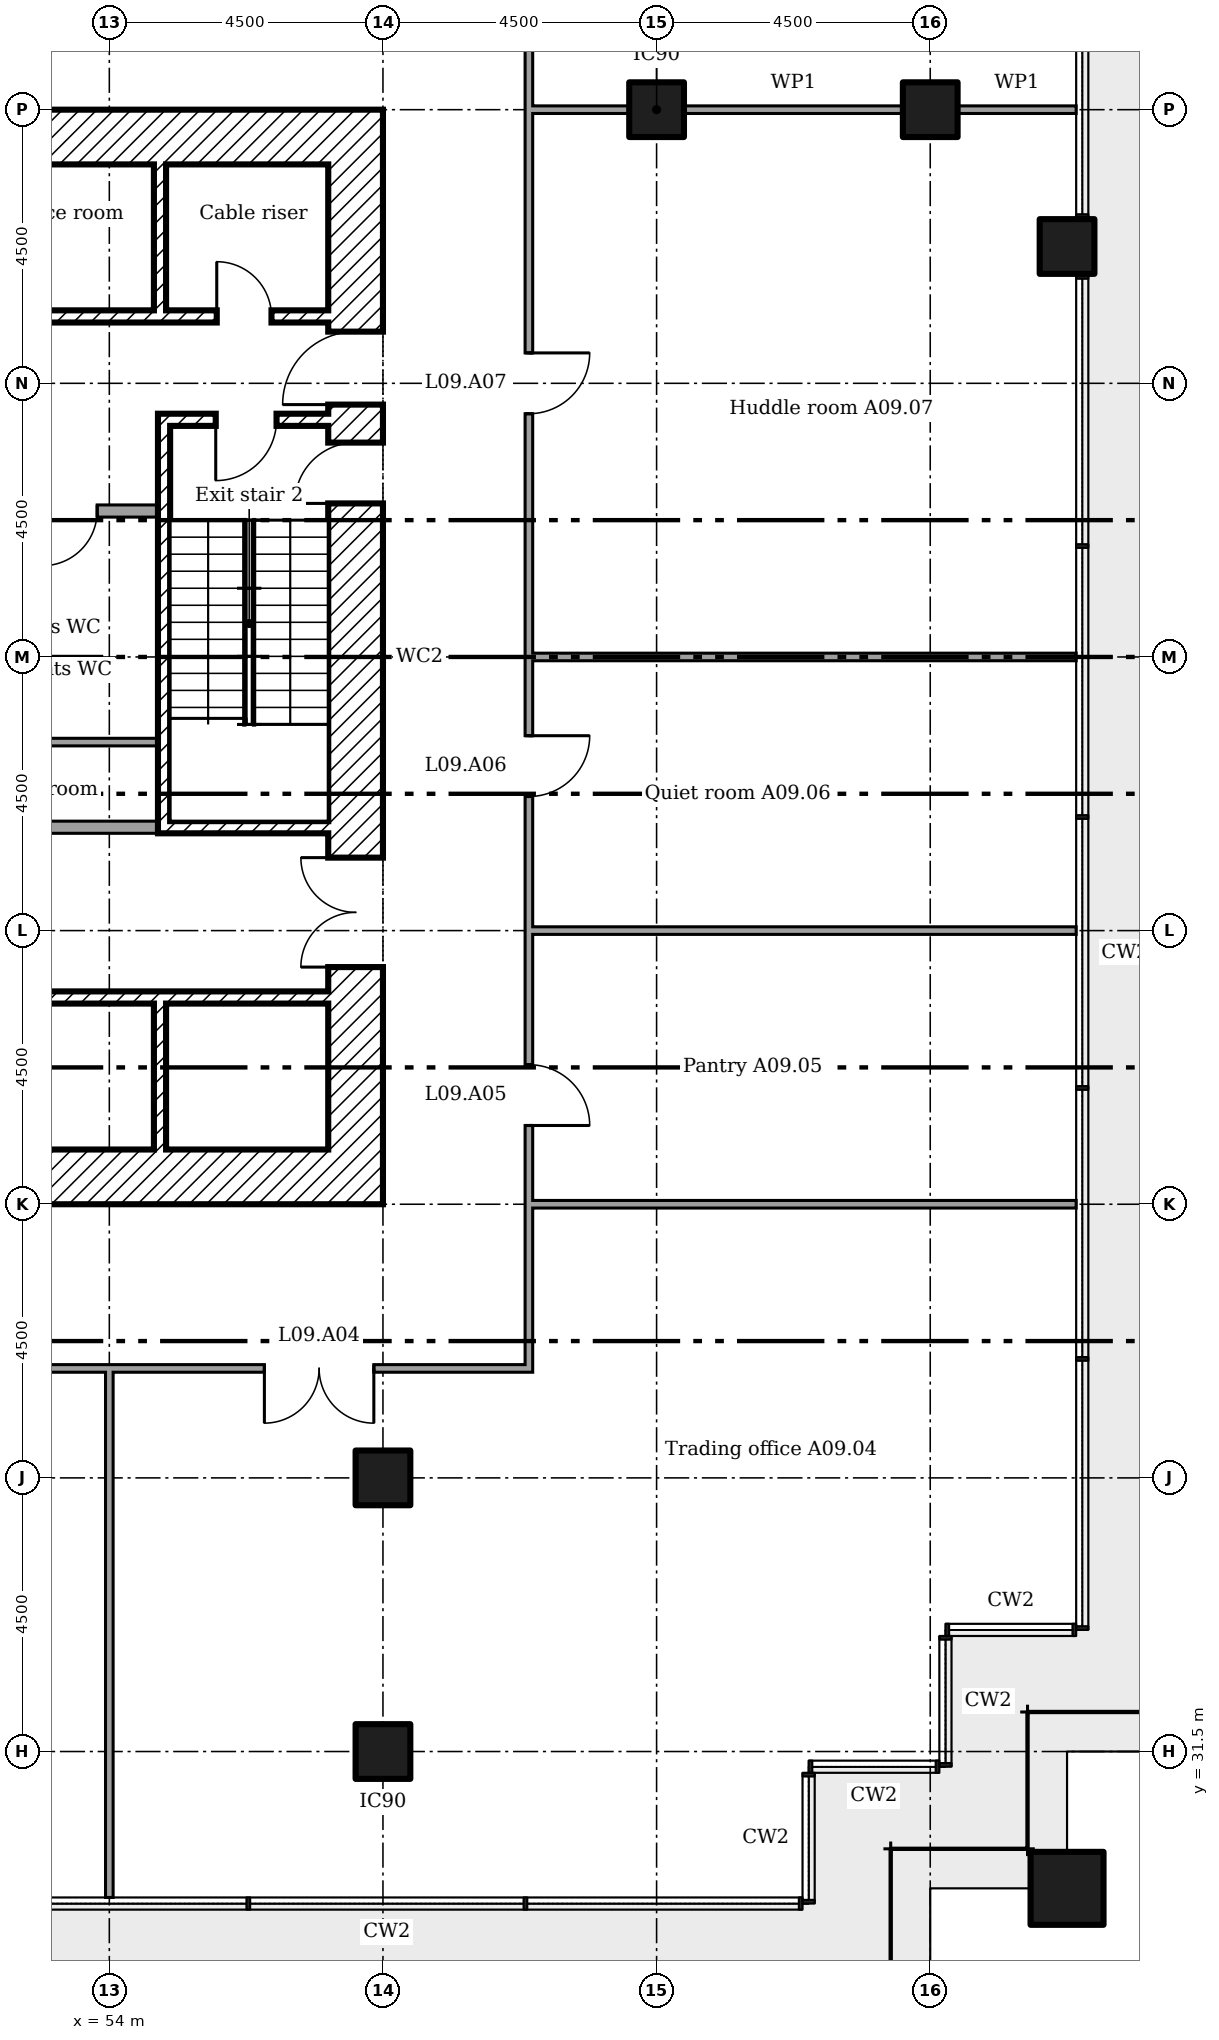
"""IFC4 building model, lengths in metres.
Left out: names, types, materials, properties, quantities, classifications, styles, units other than length and angle.
Written with IfcOpenShell. Run it as: python <this file> out.ifc"""

import sys

from ifc_helpers import new_model, si_unit, direction, frame, frame_2d, origin, origin_2d, place, context, subcontext, project, spatial, rectangle, extrude, element, fill, save


model = new_model("IFC4")
c1 = context("Model", 3, precision=1e-05, world=origin(), true_north=direction((0.0, 1.0)))
c2 = subcontext(c1, "Body", "Model", "MODEL_VIEW")
j1 = project(units=[si_unit("LENGTHUNIT", "METRE"), si_unit("PLANEANGLEUNIT", "RADIAN")], contexts=[c1])
p1 = place(None, origin())
s1 = spatial("IfcSite", under=j1, at=p1, CompositionType="ELEMENT")
p2 = place(p1, origin())
s2 = spatial("IfcBuilding", under=s1, at=p2, CompositionType="ELEMENT")
p3 = place(p2, frame((0.0, 0.0, 43.0)))
s3 = spatial("IfcBuildingStorey", under=s2, at=p3, CompositionType="ELEMENT", Elevation=43.0)
p4 = place(p3, frame((69.75, 29.25, 0.0)))
e1 = element("IfcColumn", 1, at=p4, inside=s3, PredefinedType="COLUMN", context=c2, shape_type="SweptSolid", body=[
    extrude(rectangle(XDim=1.2, YDim=1.2, at=origin_2d()), origin(), (0.0, 0.0, 1.0), 4.4),
])
for number, where in (
    (2, (58.5, 31.5, 0.0)),
    (3, (58.5, 36.0, 0.0)),
    (4, (63.0, 58.5, 0.0)),
    (5, (67.5, 58.5, 0.0)),
    (6, (69.75, 56.25, 0.0)),
):
    element("IfcColumn", number, at=place(p3, frame(where)), inside=s3, PredefinedType="COLUMN", context=c2, shape_type="SweptSolid", body=[
        extrude(rectangle(XDim=0.9, YDim=0.9, at=origin_2d()), origin(), (0.0, 0.0, 1.0), 4.4),
    ])
p5 = place(p3, frame((58.05, 40.5, 0.0), z_axis=(0.0, 0.0, 1.0), x_axis=(0.0, 1.0, 0.0)))
e7 = element("IfcWall", 7, at=p5, inside=s3, PredefinedType="SHEAR", context=c2, shape_type="SweptSolid", body=[
    extrude(rectangle(XDim=18.0, YDim=0.9, at=frame_2d((9.0, 0.0))), origin(), (0.0, 0.0, 1.0), 4.15),
])
p6 = place(p5, frame((13.15, 0.0, 0.0)))
e8 = element("IfcOpeningElement", 8, at=p6, cuts=e7, PredefinedType="OPENING", context=c2, shape_type="SweptSolid", body=[
    extrude(rectangle(XDim=1.2, YDim=2.1, at=frame_2d((0.6, 1.05))), frame((0.0, 0.46, 0.0), z_axis=(0.0, -1.0, 0.0), x_axis=(1.0, 0.0, 0.0)), (0.0, 0.0, 1.0), 0.92),
])
p7 = place(p5, frame((3.9, 0.0, 0.0)))
e9 = element("IfcOpeningElement", 9, at=p7, cuts=e7, PredefinedType="OPENING", context=c2, shape_type="SweptSolid", body=[
    extrude(rectangle(XDim=1.8, YDim=2.1, at=frame_2d((0.9, 1.05))), frame((0.0, 0.46, 0.0), z_axis=(0.0, -1.0, 0.0), x_axis=(1.0, 0.0, 0.0)), (0.0, 0.0, 1.0), 0.92),
])
p8 = place(p5, frame((11.525, 0.0, 0.0)))
e10 = element("IfcOpeningElement", 10, at=p8, cuts=e7, PredefinedType="OPENING", context=c2, shape_type="SweptSolid", body=[
    extrude(rectangle(XDim=1.0, YDim=2.1, at=frame_2d((0.5, 1.05))), frame((0.0, 0.46, 0.0), z_axis=(0.0, -1.0, 0.0), x_axis=(1.0, 0.0, 0.0)), (0.0, 0.0, 1.0), 0.92),
])
for number, where in (
    (11, (41.4, 58.05, 0.0)),
    (12, (41.4, 40.95, 0.0)),
):
    element("IfcWall", number, at=place(p3, frame(where)), inside=s3, PredefinedType="SHEAR", context=c2, shape_type="SweptSolid", body=[
        extrude(rectangle(XDim=16.2, YDim=0.9, at=frame_2d((8.1, 0.0))), origin(), (0.0, 0.0, 1.0), 4.15),
    ])
for number, where, z_axis, x_axis in (
    (13, (54.833, 57.6, 0.0), (0.0, 0.0, 1.0), (0.0, -1.0, 0.0)),
    (14, (54.833, 41.4, 0.0), (0.0, 0.0, 1.0), (0.0, 1.0, 0.0)),
):
    element("IfcWall", number, at=place(p3, frame(where, z_axis=z_axis, x_axis=x_axis)), inside=s3, PredefinedType="SHEAR", context=c2, shape_type="SweptSolid", body=[
        extrude(rectangle(XDim=2.4, YDim=0.2, at=frame_2d((1.2, 0.0))), origin(), (0.0, 0.0, 1.0), 4.15),
    ])
p9 = place(p3, frame((46.933, 55.1, 0.0)))
e15 = element("IfcWall", 15, at=p9, inside=s3, PredefinedType="SHEAR", context=c2, shape_type="SweptSolid", body=[
    extrude(rectangle(XDim=10.667, YDim=0.2, at=frame_2d((5.333, 0.0))), origin(), (0.0, 0.0, 1.0), 4.15),
])
p10 = place(p9, frame((8.833, 0.0, 0.0)))
e16 = element("IfcOpeningElement", 16, at=p10, cuts=e15, PredefinedType="OPENING", context=c2, shape_type="SweptSolid", body=[
    extrude(rectangle(XDim=0.9, YDim=2.1, at=frame_2d((0.45, 1.05))), frame((0.0, 0.11, 0.0), z_axis=(0.0, -1.0, 0.0), x_axis=(1.0, 0.0, 0.0)), (0.0, 0.0, 1.0), 0.22),
])
p11 = place(p9, frame((0.783, 0.0, 0.0)))
e17 = element("IfcOpeningElement", 17, at=p11, cuts=e15, PredefinedType="OPENING", context=c2, shape_type="SweptSolid", body=[
    extrude(rectangle(XDim=0.9, YDim=2.1, at=frame_2d((0.45, 1.05))), frame((0.0, 0.11, 0.0), z_axis=(0.0, -1.0, 0.0), x_axis=(1.0, 0.0, 0.0)), (0.0, 0.0, 1.0), 0.22),
])
p12 = place(p9, frame((4.783, 0.0, 0.0)))
e18 = element("IfcOpeningElement", 18, at=p12, cuts=e15, PredefinedType="OPENING", context=c2, shape_type="SweptSolid", body=[
    extrude(rectangle(XDim=0.9, YDim=2.1, at=frame_2d((0.45, 1.05))), frame((0.0, 0.11, 0.0), z_axis=(0.0, -1.0, 0.0), x_axis=(1.0, 0.0, 0.0)), (0.0, 0.0, 1.0), 0.22),
])
p13 = place(p3, frame((41.4, 43.9, 0.0)))
e19 = element("IfcWall", 19, at=p13, inside=s3, PredefinedType="SHEAR", context=c2, shape_type="SweptSolid", body=[
    extrude(rectangle(XDim=16.2, YDim=0.2, at=frame_2d((8.1, 0.0))), origin(), (0.0, 0.0, 1.0), 4.15),
])
p14 = place(p13, frame((0.833, 0.0, 0.0)))
e20 = element("IfcOpeningElement", 20, at=p14, cuts=e19, PredefinedType="OPENING", context=c2, shape_type="SweptSolid", body=[
    extrude(rectangle(XDim=1.2, YDim=2.1, at=frame_2d((0.6, 1.05))), frame((0.0, 0.11, 0.0), z_axis=(0.0, -1.0, 0.0), x_axis=(1.0, 0.0, 0.0)), (0.0, 0.0, 1.0), 0.22),
])
p15 = place(p13, frame((3.5, 0.0, 0.0)))
e21 = element("IfcOpeningElement", 21, at=p15, cuts=e19, PredefinedType="OPENING", context=c2, shape_type="SweptSolid", body=[
    extrude(rectangle(XDim=1.2, YDim=2.1, at=frame_2d((0.6, 1.05))), frame((0.0, 0.11, 0.0), z_axis=(0.0, -1.0, 0.0), x_axis=(1.0, 0.0, 0.0)), (0.0, 0.0, 1.0), 0.22),
])
p16 = place(p13, frame((6.167, 0.0, 0.0)))
e22 = element("IfcOpeningElement", 22, at=p16, cuts=e19, PredefinedType="OPENING", context=c2, shape_type="SweptSolid", body=[
    extrude(rectangle(XDim=1.2, YDim=2.1, at=frame_2d((0.6, 1.05))), frame((0.0, 0.11, 0.0), z_axis=(0.0, -1.0, 0.0), x_axis=(1.0, 0.0, 0.0)), (0.0, 0.0, 1.0), 0.22),
])
p17 = place(p13, frame((8.833, 0.0, 0.0)))
e23 = element("IfcOpeningElement", 23, at=p17, cuts=e19, PredefinedType="OPENING", context=c2, shape_type="SweptSolid", body=[
    extrude(rectangle(XDim=1.2, YDim=2.1, at=frame_2d((0.6, 1.05))), frame((0.0, 0.11, 0.0), z_axis=(0.0, -1.0, 0.0), x_axis=(1.0, 0.0, 0.0)), (0.0, 0.0, 1.0), 0.22),
])
p18 = place(p3, frame((54.8, 53.4, 0.0)))
e24 = element("IfcWall", 24, at=p18, inside=s3, PredefinedType="SHEAR", context=c2, shape_type="SweptSolid", body=[
    extrude(rectangle(XDim=2.8, YDim=0.2, at=frame_2d((1.4, 0.0))), origin(), (0.0, 0.0, 1.0), 4.15),
])
p19 = place(p18, frame((0.95, 0.0, 0.0)))
e25 = element("IfcOpeningElement", 25, at=p19, cuts=e24, PredefinedType="OPENING", context=c2, shape_type="SweptSolid", body=[
    extrude(rectangle(XDim=1.0, YDim=2.1, at=frame_2d((0.5, 1.05))), frame((0.0, 0.11, 0.0), z_axis=(0.0, -1.0, 0.0), x_axis=(1.0, 0.0, 0.0)), (0.0, 0.0, 1.0), 0.22),
])
p20 = place(p3, frame((54.8, 46.7, 0.0)))
e26 = element("IfcWall", 26, at=p20, inside=s3, PredefinedType="SHEAR", context=c2, shape_type="SweptSolid", body=[
    extrude(rectangle(XDim=2.8, YDim=0.2, at=frame_2d((1.4, 0.0))), origin(), (0.0, 0.0, 1.0), 4.15),
])
p21 = place(p3, frame((54.9, 46.8, 0.0), z_axis=(0.0, 0.0, 1.0), x_axis=(0.0, 1.0, 0.0)))
e27 = element("IfcWall", 27, at=p21, inside=s3, PredefinedType="SHEAR", context=c2, shape_type="SweptSolid", body=[
    extrude(rectangle(XDim=6.5, YDim=0.2, at=frame_2d((3.25, 0.0))), origin(), (0.0, 0.0, 1.0), 4.15),
])
p22 = place(p3, frame((44.2, 51.9, 0.0)))
e28 = element("IfcWall", 28, at=p22, inside=s3, PredefinedType="PARTITIONING", context=c2, shape_type="SweptSolid", body=[
    extrude(rectangle(XDim=10.6, YDim=0.2, at=frame_2d((5.3, 0.0))), origin(), (0.0, 0.0, 1.0), 4.15),
])
p23 = place(p22, frame((4.625, 0.0, 0.0)))
e29 = element("IfcOpeningElement", 29, at=p23, cuts=e28, PredefinedType="OPENING", context=c2, shape_type="SweptSolid", body=[
    extrude(rectangle(XDim=0.9, YDim=2.1, at=frame_2d((0.45, 1.05))), frame((0.0, 0.11, 0.0), z_axis=(0.0, -1.0, 0.0), x_axis=(1.0, 0.0, 0.0)), (0.0, 0.0, 1.0), 0.22),
])
p24 = place(p22, frame((6.25, 0.0, 0.0)))
e30 = element("IfcOpeningElement", 30, at=p24, cuts=e28, PredefinedType="OPENING", context=c2, shape_type="SweptSolid", body=[
    extrude(rectangle(XDim=0.9, YDim=2.1, at=frame_2d((0.45, 1.05))), frame((0.0, 0.11, 0.0), z_axis=(0.0, -1.0, 0.0), x_axis=(1.0, 0.0, 0.0)), (0.0, 0.0, 1.0), 0.22),
])
p25 = place(p22, frame((8.7, 0.0, 0.0)))
e31 = element("IfcOpeningElement", 31, at=p25, cuts=e28, PredefinedType="OPENING", context=c2, shape_type="SweptSolid", body=[
    extrude(rectangle(XDim=0.9, YDim=2.1, at=frame_2d((0.45, 1.05))), frame((0.0, 0.11, 0.0), z_axis=(0.0, -1.0, 0.0), x_axis=(1.0, 0.0, 0.0)), (0.0, 0.0, 1.0), 0.22),
])
p26 = place(p3, frame((44.2, 46.7, 0.0)))
e32 = element("IfcWall", 32, at=p26, inside=s3, PredefinedType="PARTITIONING", context=c2, shape_type="SweptSolid", body=[
    extrude(rectangle(XDim=10.6, YDim=0.2, at=frame_2d((5.3, 0.0))), origin(), (0.0, 0.0, 1.0), 4.15),
])
p27 = place(p26, frame((4.85, 0.0, 0.0)))
e33 = element("IfcOpeningElement", 33, at=p27, cuts=e32, PredefinedType="OPENING", context=c2, shape_type="SweptSolid", body=[
    extrude(rectangle(XDim=0.9, YDim=2.1, at=frame_2d((0.45, 1.05))), frame((0.0, 0.11, 0.0), z_axis=(0.0, -1.0, 0.0), x_axis=(1.0, 0.0, 0.0)), (0.0, 0.0, 1.0), 0.22),
])
p28 = place(p3, frame((54.8, 48.1, 0.0), z_axis=(0.0, 0.0, 1.0), x_axis=(-1.0, 0.0, 0.0)))
e34 = element("IfcWall", 34, at=p28, inside=s3, PredefinedType="PARTITIONING", context=c2, shape_type="SweptSolid", body=[
    extrude(rectangle(XDim=2.9, YDim=0.125, at=frame_2d((1.45, 0.0))), origin(), (0.0, 0.0, 1.0), 4.15),
])
p29 = place(p3, frame((38.038, 37.8, 0.0)))
e35 = element("IfcWall", 35, at=p29, inside=s3, PredefinedType="PARTITIONING", context=c2, shape_type="SweptSolid", body=[
    extrude(rectangle(XDim=22.925, YDim=0.125, at=frame_2d((11.462, 0.0))), origin(), (0.0, 0.0, 1.0), 4.25),
])
p30 = place(p29, frame((3.758, 0.0, 0.0)))
e36 = element("IfcOpeningElement", 36, at=p30, cuts=e35, PredefinedType="OPENING", context=c2, shape_type="SweptSolid", body=[
    extrude(rectangle(XDim=1.0, YDim=2.1, at=frame_2d((0.5, 1.05))), frame((0.0, 0.073, 0.0), z_axis=(0.0, -1.0, 0.0), x_axis=(1.0, 0.0, 0.0)), (0.0, 0.0, 1.0), 0.145),
])
p31 = place(p29, frame((12.205, 0.0, 0.0)))
e37 = element("IfcOpeningElement", 37, at=p31, cuts=e35, PredefinedType="OPENING", context=c2, shape_type="SweptSolid", body=[
    extrude(rectangle(XDim=1.0, YDim=2.1, at=frame_2d((0.5, 1.05))), frame((0.0, 0.073, 0.0), z_axis=(0.0, -1.0, 0.0), x_axis=(1.0, 0.0, 0.0)), (0.0, 0.0, 1.0), 0.145),
])
p32 = place(p29, frame((18.512, 0.0, 0.0)))
e38 = element("IfcOpeningElement", 38, at=p32, cuts=e35, PredefinedType="OPENING", context=c2, shape_type="SweptSolid", body=[
    extrude(rectangle(XDim=1.8, YDim=2.1, at=frame_2d((0.9, 1.05))), frame((0.0, 0.073, 0.0), z_axis=(0.0, -1.0, 0.0), x_axis=(1.0, 0.0, 0.0)), (0.0, 0.0, 1.0), 0.145),
])
for number, where in (
    (39, (60.9, 40.5, 0.0)),
    (40, (60.9, 45.0, 0.0)),
    (41, (60.9, 49.5, 0.0)),
):
    element("IfcWall", number, at=place(p3, frame(where)), inside=s3, PredefinedType="PARTITIONING", context=c2, shape_type="SweptSolid", body=[
        extrude(rectangle(XDim=9.0, YDim=0.125, at=frame_2d((4.5, 0.0))), origin(), (0.0, 0.0, 1.0), 3.566),
    ])
p33 = place(p3, frame((60.9, 58.5, 0.0)))
e42 = element("IfcWall", 42, at=p33, inside=s3, PredefinedType="PARTITIONING", context=c2, shape_type="SweptSolid", body=[
    extrude(rectangle(XDim=1.65, YDim=0.125, at=frame_2d((0.825, 0.0))), origin(), (0.0, 0.0, 1.0), 3.476),
])
p34 = place(p3, frame((63.45, 58.5, 0.0)))
e43 = element("IfcWall", 43, at=p34, inside=s3, PredefinedType="PARTITIONING", context=c2, shape_type="SweptSolid", body=[
    extrude(rectangle(XDim=3.6, YDim=0.125, at=frame_2d((1.8, 0.0))), origin(), (0.0, 0.0, 1.0), 3.476),
])
p35 = place(p3, frame((67.95, 58.5, 0.0)))
e44 = element("IfcWall", 44, at=p35, inside=s3, PredefinedType="PARTITIONING", context=c2, shape_type="SweptSolid", body=[
    extrude(rectangle(XDim=1.95, YDim=0.125, at=frame_2d((0.975, 0.0))), origin(), (0.0, 0.0, 1.0), 3.476),
])
p36 = place(p3, frame((54.0, 29.1, 0.0), z_axis=(0.0, 0.0, 1.0), x_axis=(0.0, 1.0, 0.0)))
e45 = element("IfcWall", 45, at=p36, inside=s3, PredefinedType="PARTITIONING", context=c2, shape_type="SweptSolid", body=[
    extrude(rectangle(XDim=8.7, YDim=0.125, at=frame_2d((4.35, 0.0))), origin(), (0.0, 0.0, 1.0), 3.566),
])
p37 = place(p3, frame((60.9, 37.863, 0.0), z_axis=(0.0, 0.0, 1.0), x_axis=(0.0, 1.0, 0.0)))
e46 = element("IfcWall", 46, at=p37, inside=s3, PredefinedType="PARTITIONING", context=c2, shape_type="SweptSolid", body=[
    extrude(rectangle(XDim=22.975, YDim=0.125, at=frame_2d((11.487, 0.0))), origin(), (0.0, 0.0, 1.0), 4.25),
])
p38 = place(p37, frame((3.933, 0.0, 0.0)))
e47 = element("IfcOpeningElement", 47, at=p38, cuts=e46, PredefinedType="OPENING", context=c2, shape_type="SweptSolid", body=[
    extrude(rectangle(XDim=1.0, YDim=2.1, at=frame_2d((0.5, 1.05))), frame((0.0, 0.073, 0.0), z_axis=(0.0, -1.0, 0.0), x_axis=(1.0, 0.0, 0.0)), (0.0, 0.0, 1.0), 0.145),
])
p39 = place(p37, frame((9.343, 0.0, 0.0)))
e48 = element("IfcOpeningElement", 48, at=p39, cuts=e46, PredefinedType="OPENING", context=c2, shape_type="SweptSolid", body=[
    extrude(rectangle(XDim=1.0, YDim=2.1, at=frame_2d((0.5, 1.05))), frame((0.0, 0.073, 0.0), z_axis=(0.0, -1.0, 0.0), x_axis=(1.0, 0.0, 0.0)), (0.0, 0.0, 1.0), 0.145),
])
p40 = place(p37, frame((15.637, 0.0, 0.0)))
e49 = element("IfcOpeningElement", 49, at=p40, cuts=e46, PredefinedType="OPENING", context=c2, shape_type="SweptSolid", body=[
    extrude(rectangle(XDim=1.0, YDim=2.1, at=frame_2d((0.5, 1.05))), frame((0.0, 0.073, 0.0), z_axis=(0.0, -1.0, 0.0), x_axis=(1.0, 0.0, 0.0)), (0.0, 0.0, 1.0), 0.145),
])
p41 = place(p6, origin())
e50 = element("IfcDoor", 50, at=p41, inside=s3, OperationType="SINGLE_SWING_RIGHT", PredefinedType="DOOR", context=c2, shape_type="SweptSolid", body=[
    extrude(rectangle(XDim=1.2, YDim=2.1, at=frame_2d((0.6, 1.05))), frame((0.0, 0.025, 0.0), z_axis=(0.0, -1.0, 0.0), x_axis=(1.0, 0.0, 0.0)), (0.0, 0.0, 1.0), 0.05),
])
fill(e8, e50)
p42 = place(p7, origin())
e51 = element("IfcDoor", 51, at=p42, inside=s3, OperationType="DOUBLE_DOOR_SINGLE_SWING", PredefinedType="DOOR", context=c2, shape_type="SweptSolid", body=[
    extrude(rectangle(XDim=1.8, YDim=2.1, at=frame_2d((0.9, 1.05))), frame((0.0, 0.025, 0.0), z_axis=(0.0, -1.0, 0.0), x_axis=(1.0, 0.0, 0.0)), (0.0, 0.0, 1.0), 0.05),
])
fill(e9, e51)
p43 = place(p19, frame((1.0, 0.0, 0.0), x_axis=(-1.0, 0.0, 0.0)))
e52 = element("IfcDoor", 52, at=p43, inside=s3, OperationType="SINGLE_SWING_LEFT", PredefinedType="DOOR", context=c2, shape_type="SweptSolid", body=[
    extrude(rectangle(XDim=1.0, YDim=2.1, at=frame_2d((0.5, 1.05))), frame((0.0, 0.025, 0.0), z_axis=(0.0, -1.0, 0.0), x_axis=(1.0, 0.0, 0.0)), (0.0, 0.0, 1.0), 0.05),
])
fill(e25, e52)
p44 = place(p8, origin())
e53 = element("IfcDoor", 53, at=p44, inside=s3, OperationType="SINGLE_SWING_RIGHT", PredefinedType="DOOR", context=c2, shape_type="SweptSolid", body=[
    extrude(rectangle(XDim=1.0, YDim=2.1, at=frame_2d((0.5, 1.05))), frame((0.0, 0.025, 0.0), z_axis=(0.0, -1.0, 0.0), x_axis=(1.0, 0.0, 0.0)), (0.0, 0.0, 1.0), 0.05),
])
fill(e10, e53)
p45 = place(p10, origin())
e54 = element("IfcDoor", 54, at=p45, inside=s3, OperationType="SINGLE_SWING_RIGHT", PredefinedType="DOOR", context=c2, shape_type="SweptSolid", body=[
    extrude(rectangle(XDim=0.9, YDim=2.1, at=frame_2d((0.45, 1.05))), frame((0.0, 0.025, 0.0), z_axis=(0.0, -1.0, 0.0), x_axis=(1.0, 0.0, 0.0)), (0.0, 0.0, 1.0), 0.05),
])
fill(e16, e54)
p46 = place(p25, frame((0.9, 0.0, 0.0), x_axis=(-1.0, 0.0, 0.0)))
e55 = element("IfcDoor", 55, at=p46, inside=s3, OperationType="SINGLE_SWING_LEFT", PredefinedType="DOOR", context=c2, shape_type="SweptSolid", body=[
    extrude(rectangle(XDim=0.9, YDim=2.1, at=frame_2d((0.45, 1.05))), frame((0.0, 0.025, 0.0), z_axis=(0.0, -1.0, 0.0), x_axis=(1.0, 0.0, 0.0)), (0.0, 0.0, 1.0), 0.05),
])
fill(e31, e55)
p47 = place(p32, frame((1.8, 0.0, 0.0), x_axis=(-1.0, 0.0, 0.0)))
e56 = element("IfcDoor", 56, at=p47, inside=s3, OperationType="DOUBLE_DOOR_SINGLE_SWING", PredefinedType="DOOR", context=c2, shape_type="SweptSolid", body=[
    extrude(rectangle(XDim=1.8, YDim=2.1, at=frame_2d((0.9, 1.05))), frame((0.0, 0.025, 0.0), z_axis=(0.0, -1.0, 0.0), x_axis=(1.0, 0.0, 0.0)), (0.0, 0.0, 1.0), 0.05),
])
fill(e38, e56)
p48 = place(p38, frame((1.0, 0.0, 0.0), x_axis=(-1.0, 0.0, 0.0)))
e57 = element("IfcDoor", 57, at=p48, inside=s3, OperationType="SINGLE_SWING_LEFT", PredefinedType="DOOR", context=c2, shape_type="SweptSolid", body=[
    extrude(rectangle(XDim=1.0, YDim=2.1, at=frame_2d((0.5, 1.05))), frame((0.0, 0.025, 0.0), z_axis=(0.0, -1.0, 0.0), x_axis=(1.0, 0.0, 0.0)), (0.0, 0.0, 1.0), 0.05),
])
fill(e47, e57)
p49 = place(p39, frame((1.0, 0.0, 0.0), x_axis=(-1.0, 0.0, 0.0)))
e58 = element("IfcDoor", 58, at=p49, inside=s3, OperationType="SINGLE_SWING_RIGHT", PredefinedType="DOOR", context=c2, shape_type="SweptSolid", body=[
    extrude(rectangle(XDim=1.0, YDim=2.1, at=frame_2d((0.5, 1.05))), frame((0.0, 0.025, 0.0), z_axis=(0.0, -1.0, 0.0), x_axis=(1.0, 0.0, 0.0)), (0.0, 0.0, 1.0), 0.05),
])
fill(e48, e58)
p50 = place(p40, frame((1.0, 0.0, 0.0), x_axis=(-1.0, 0.0, 0.0)))
e59 = element("IfcDoor", 59, at=p50, inside=s3, OperationType="SINGLE_SWING_RIGHT", PredefinedType="DOOR", context=c2, shape_type="SweptSolid", body=[
    extrude(rectangle(XDim=1.0, YDim=2.1, at=frame_2d((0.5, 1.05))), frame((0.0, 0.025, 0.0), z_axis=(0.0, -1.0, 0.0), x_axis=(1.0, 0.0, 0.0)), (0.0, 0.0, 1.0), 0.05),
])
fill(e49, e59)
save(model, sys.argv[1])
